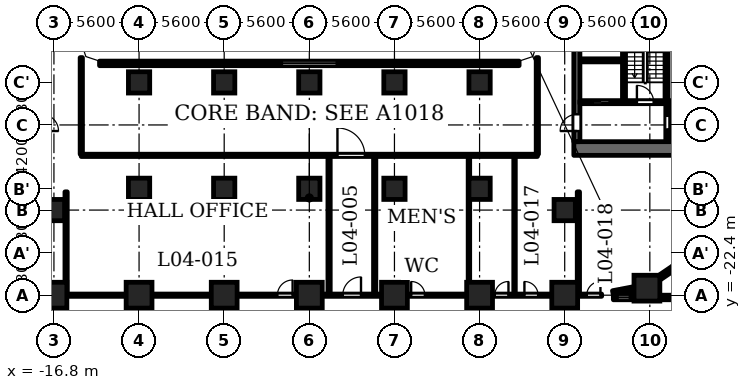
"""IFC4 building model, lengths in metres.
Left out: names, types, materials, properties, quantities, classifications, styles, units other than length and angle.
Written with IfcOpenShell. Run it as: python <this file> out.ifc"""

import sys

from ifc_helpers import new_model, si_unit, direction, frame, frame_2d, origin, origin_2d, place, context, subcontext, project, spatial, polyline, rectangle, outline, extrude, element, fill, save


model = new_model("IFC4")
c1 = context("Model", 3, precision=1e-05, world=origin(), true_north=direction((0.0, 1.0)))
c2 = subcontext(c1, "Body", "Model", "MODEL_VIEW")
j1 = project(units=[si_unit("LENGTHUNIT", "METRE"), si_unit("PLANEANGLEUNIT", "RADIAN")], contexts=[c1])
p1 = place(None, origin())
s1 = spatial("IfcSite", under=j1, at=p1, CompositionType="ELEMENT")
p2 = place(p1, origin())
s2 = spatial("IfcBuilding", under=s1, at=p2, CompositionType="ELEMENT")
p3 = place(p2, frame((0.0, 0.0, 20.9)))
s3 = spatial("IfcBuildingStorey", under=s2, at=p3, CompositionType="ELEMENT", Elevation=20.9)
for number, where, z_axis, x_axis in (
    (1, (-16.8, -22.4, 0.0), (0.0, 0.0, 1.0), (1.0, 0.0, 0.0)),
    (2, (-11.2, -22.4, 0.0), (0.0, 0.0, 1.0), (1.0, 0.0, 0.0)),
    (3, (-5.6, -22.4, 0.0), (0.0, 0.0, 1.0), (1.0, 0.0, 0.0)),
    (4, (0.0, -22.4, 0.0), (0.0, 0.0, 1.0), (1.0, 0.0, 0.0)),
    (5, (5.6, -22.4, 0.0), (0.0, 0.0, 1.0), (1.0, 0.0, 0.0)),
    (6, (11.2, -22.4, 0.0), (0.0, 0.0, 1.0), (1.0, 0.0, 0.0)),
    (7, (16.8, -22.4, 0.0), (0.0, 0.0, 1.0), (1.0, 0.0, 0.0)),
    (8, (22.209, -21.938, 0.0), (0.0, 0.0, 1.0), (1.0, 0.0, 0.0)),
):
    element("IfcColumn", number, at=place(p3, frame(where, z_axis=z_axis, x_axis=x_axis)), inside=s3, PredefinedType="COLUMN", context=c2, shape_type="SweptSolid", body=[
        extrude(rectangle(XDim=1.7, YDim=1.7, at=origin_2d()), origin(), (0.0, 0.0, 1.0), 4.8),
    ])
for number, where, z_axis, x_axis in (
    (9, (-16.8, -16.8, 0.0), (0.0, 0.0, 1.0), (1.0, 0.0, 0.0)),
    (10, (-11.2, -8.4, 0.0), (0.0, 0.0, 1.0), (1.0, 0.0, 0.0)),
    (11, (-5.6, -8.4, 0.0), (0.0, 0.0, 1.0), (1.0, 0.0, 0.0)),
    (12, (0.0, -8.4, 0.0), (0.0, 0.0, 1.0), (1.0, 0.0, 0.0)),
    (13, (5.6, -8.4, 0.0), (0.0, 0.0, 1.0), (1.0, 0.0, 0.0)),
    (14, (11.2, -8.4, 0.0), (0.0, 0.0, 1.0), (1.0, 0.0, 0.0)),
    (15, (16.8, -16.8, 0.0), (0.0, 0.0, 1.0), (1.0, 0.0, 0.0)),
    (16, (-11.2, -15.4, 0.0), (0.0, 0.0, 1.0), (1.0, 0.0, 0.0)),
    (17, (-5.6, -15.4, 0.0), (0.0, 0.0, 1.0), (1.0, 0.0, 0.0)),
    (18, (0.0, -15.4, 0.0), (0.0, 0.0, 1.0), (1.0, 0.0, 0.0)),
    (19, (5.6, -15.4, 0.0), (0.0, 0.0, 1.0), (1.0, 0.0, 0.0)),
    (20, (11.2, -15.4, 0.0), (0.0, 0.0, 1.0), (1.0, 0.0, 0.0)),
):
    element("IfcColumn", number, at=place(p3, frame(where, z_axis=z_axis, x_axis=x_axis)), inside=s3, PredefinedType="COLUMN", context=c2, shape_type="SweptSolid", body=[
        extrude(rectangle(XDim=1.4, YDim=1.4, at=origin_2d()), origin(), (0.0, 0.0, 1.0), 4.8),
    ])
p4 = place(p3, frame((27.5, -22.55, 0.0), z_axis=(0.0, 0.0, 1.0), x_axis=(-1.0, 0.0, 0.0)))
e21 = element("IfcWall", 21, at=p4, inside=s3, PredefinedType="SOLIDWALL", context=c2, shape_type="SweptSolid", body=[
    extrude(rectangle(XDim=4.441, YDim=0.3, at=frame_2d((2.221, 0.0))), origin(), (0.0, 0.0, 1.0), 4.45),
])
p5 = place(p4, frame((1.321, 0.0, 0.9)))
e22 = element("IfcOpeningElement", 22, at=p5, cuts=e21, PredefinedType="OPENING", context=c2, shape_type="SweptSolid", body=[
    extrude(rectangle(XDim=1.8, YDim=1.25, at=frame_2d((0.9, 0.625))), frame((0.0, 0.16, 0.0), z_axis=(0.0, -1.0, 0.0), x_axis=(1.0, 0.0, 0.0)), (0.0, 0.0, 1.0), 0.32),
])
p6 = place(p3, frame((21.359, -22.55, 0.0), z_axis=(0.0, 0.0, 1.0), x_axis=(-1.0, 0.0, 0.0)))
e23 = element("IfcWall", 23, at=p6, inside=s3, PredefinedType="SOLIDWALL", context=c2, shape_type="SweptSolid", body=[
    extrude(rectangle(XDim=1.359, YDim=0.3, at=frame_2d((0.679, 0.0))), origin(), (0.0, 0.0, 1.0), 3.55),
])
p7 = place(p6, frame((0.279, 0.0, 0.6)))
e24 = element("IfcOpeningElement", 24, at=p7, cuts=e23, PredefinedType="OPENING", context=c2, shape_type="SweptSolid", body=[
    extrude(rectangle(XDim=0.8, YDim=1.55, at=frame_2d((0.4, 0.775))), frame((0.0, 0.16, 0.0), z_axis=(0.0, -1.0, 0.0), x_axis=(1.0, 0.0, 0.0)), (0.0, 0.0, 1.0), 0.32),
])
for number, where, z_axis, x_axis in (
    (25, (19.972, -22.253, 0.0), (0.0, 0.0, 1.0), (0.982, 0.187, 0.0)),
    (26, (22.85, -21.369, 0.0), (0.0, 0.0, 1.0), (0.827, 0.562, 0.0)),
):
    element("IfcWall", number, at=place(p3, frame(where, z_axis=z_axis, x_axis=x_axis)), inside=s3, PredefinedType="SOLIDWALL", context=c2, shape_type="SweptSolid", body=[
        extrude(rectangle(XDim=1.406, YDim=0.3, at=frame_2d((0.703, 0.0))), origin(), (0.0, 0.0, 1.0), 3.55),
    ])
p8 = place(p3, frame((13.8, -7.15, 0.0), z_axis=(0.0, 0.0, 1.0), x_axis=(-1.0, 0.0, 0.0)))
e27 = element("IfcWall", 27, at=p8, inside=s3, PredefinedType="SOLIDWALL", context=c2, shape_type="SweptSolid", body=[
    extrude(rectangle(XDim=27.6, YDim=0.3, at=frame_2d((13.8, 0.0))), origin(), (0.0, 0.0, 1.0), 4.45),
])
p9 = place(p8, frame((12.0, 0.0, 1.2)))
e28 = element("IfcOpeningElement", 28, at=p9, cuts=e27, PredefinedType="OPENING", context=c2, shape_type="SweptSolid", body=[
    extrude(rectangle(XDim=3.6, YDim=0.95, at=frame_2d((1.8, 0.475))), frame((0.0, 0.16, 0.0), z_axis=(0.0, -1.0, 0.0), x_axis=(1.0, 0.0, 0.0)), (0.0, 0.0, 1.0), 0.32),
])
p10 = place(p3, frame((20.7, -9.6, 0.0), z_axis=(0.0, 0.0, 1.0), x_axis=(0.0, 1.0, 0.0)))
e29 = element("IfcWall", 29, at=p10, inside=s3, PredefinedType="SHEAR", context=c2, shape_type="SweptSolid", body=[
    extrude(rectangle(XDim=9.75, YDim=0.2, at=frame_2d((4.875, 0.0))), origin(), (0.0, 0.0, 1.0), 4.45),
])
p11 = place(p3, frame((17.4, -12.75, 0.0), z_axis=(0.0, 0.0, 1.0), x_axis=(1.0, 0.0, 0.0)))
e30 = element("IfcWall", 30, at=p11, inside=s3, PredefinedType="SHEAR", context=c2, shape_type="SweptSolid", body=[
    extrude(rectangle(XDim=10.4, YDim=0.9, at=frame_2d((5.2, 0.0))), origin(), (0.0, 0.0, 1.0), 4.45),
])
p12 = place(p3, frame((17.6, -12.3, 0.0), z_axis=(0.0, 0.0, 1.0), x_axis=(0.0, 1.0, 0.0)))
e31 = element("IfcWall", 31, at=p12, inside=s3, PredefinedType="SHEAR", context=c2, shape_type="SweptSolid", body=[
    extrude(rectangle(XDim=24.6, YDim=0.4, at=frame_2d((12.3, 0.0))), origin(), (0.0, 0.0, 1.0), 4.45),
])
p13 = place(p12, frame((6.0, 0.0, 0.0)))
e32 = element("IfcOpeningElement", 32, at=p13, cuts=e31, PredefinedType="OPENING", context=c2, shape_type="SweptSolid", body=[
    extrude(rectangle(XDim=1.1, YDim=2.1, at=frame_2d((0.55, 1.05))), frame((0.0, 0.21, 0.0), z_axis=(0.0, -1.0, 0.0), x_axis=(1.0, 0.0, 0.0)), (0.0, 0.0, 1.0), 0.42),
])
p14 = place(p12, frame((8.4, 0.0, 0.0)))
e33 = element("IfcOpeningElement", 33, at=p14, cuts=e31, PredefinedType="OPENING", context=c2, shape_type="SweptSolid", body=[
    extrude(rectangle(XDim=1.1, YDim=2.1, at=frame_2d((0.55, 1.05))), frame((0.0, 0.21, 0.0), z_axis=(0.0, -1.0, 0.0), x_axis=(1.0, 0.0, 0.0)), (0.0, 0.0, 1.0), 0.42),
])
p15 = place(p12, frame((10.8, 0.0, 0.0)))
e34 = element("IfcOpeningElement", 34, at=p15, cuts=e31, PredefinedType="OPENING", context=c2, shape_type="SweptSolid", body=[
    extrude(rectangle(XDim=1.1, YDim=2.1, at=frame_2d((0.55, 1.05))), frame((0.0, 0.21, 0.0), z_axis=(0.0, -1.0, 0.0), x_axis=(1.0, 0.0, 0.0)), (0.0, 0.0, 1.0), 0.42),
])
p16 = place(p12, frame((16.75, 0.0, 0.0)))
e35 = element("IfcOpeningElement", 35, at=p16, cuts=e31, PredefinedType="OPENING", context=c2, shape_type="SweptSolid", body=[
    extrude(rectangle(XDim=0.9, YDim=2.1, at=frame_2d((0.45, 1.05))), frame((0.0, 0.21, 0.0), z_axis=(0.0, -1.0, 0.0), x_axis=(1.0, 0.0, 0.0)), (0.0, 0.0, 1.0), 0.42),
])
p17 = place(p12, frame((22.8, 0.0, 0.0)))
e36 = element("IfcOpeningElement", 36, at=p17, cuts=e31, PredefinedType="OPENING", context=c2, shape_type="SweptSolid", body=[
    extrude(rectangle(XDim=1.1, YDim=2.1, at=frame_2d((0.55, 1.05))), frame((0.0, 0.21, 0.0), z_axis=(0.0, -1.0, 0.0), x_axis=(1.0, 0.0, 0.0)), (0.0, 0.0, 1.0), 0.42),
])
p18 = place(p12, frame((0.7, 0.0, 0.0)))
e37 = element("IfcOpeningElement", 37, at=p18, cuts=e31, PredefinedType="OPENING", context=c2, shape_type="SweptSolid", body=[
    extrude(rectangle(XDim=1.1, YDim=2.1, at=frame_2d((0.55, 1.05))), frame((0.0, 0.21, 0.0), z_axis=(0.0, -1.0, 0.0), x_axis=(1.0, 0.0, 0.0)), (0.0, 0.0, 1.0), 0.42),
])
p19 = place(p12, frame((12.775, 0.0, 0.0)))
e38 = element("IfcOpeningElement", 38, at=p19, cuts=e31, PredefinedType="OPENING", context=c2, shape_type="SweptSolid", body=[
    extrude(rectangle(XDim=1.8, YDim=2.1, at=frame_2d((0.9, 1.05))), frame((0.0, 0.21, 0.0), z_axis=(0.0, -1.0, 0.0), x_axis=(1.0, 0.0, 0.0)), (0.0, 0.0, 1.0), 0.42),
])
p20 = place(p3, frame((23.55, -12.3, 0.0), z_axis=(0.0, 0.0, 1.0), x_axis=(0.0, 1.0, 0.0)))
e39 = element("IfcWall", 39, at=p20, inside=s3, PredefinedType="PARTITIONING", context=c2, shape_type="SweptSolid", body=[
    extrude(rectangle(XDim=2.5, YDim=0.2, at=frame_2d((1.25, 0.0))), origin(), (0.0, 0.0, 1.0), 4.45),
])
p21 = place(p20, frame((0.8, 0.0, 0.0)))
e40 = element("IfcOpeningElement", 40, at=p21, cuts=e39, PredefinedType="OPENING", context=c2, shape_type="SweptSolid", body=[
    extrude(rectangle(XDim=0.9, YDim=2.1, at=frame_2d((0.45, 1.05))), frame((0.0, 0.11, 0.0), z_axis=(0.0, -1.0, 0.0), x_axis=(1.0, 0.0, 0.0)), (0.0, 0.0, 1.0), 0.22),
])
p22 = place(p3, frame((17.8, -9.7, 0.0), z_axis=(0.0, 0.0, 1.0), x_axis=(1.0, 0.0, 0.0)))
e41 = element("IfcWall", 41, at=p22, inside=s3, PredefinedType="SHEAR", context=c2, shape_type="SweptSolid", body=[
    extrude(rectangle(XDim=8.3, YDim=0.2, at=frame_2d((4.15, 0.0))), origin(), (0.0, 0.0, 1.0), 4.45),
])
p23 = place(p22, frame((0.85, 0.0, 0.0)))
e42 = element("IfcOpeningElement", 42, at=p23, cuts=e41, PredefinedType="OPENING", context=c2, shape_type="SweptSolid", body=[
    extrude(rectangle(XDim=1.1, YDim=2.1, at=frame_2d((0.55, 1.05))), frame((0.0, 0.11, 0.0), z_axis=(0.0, -1.0, 0.0), x_axis=(1.0, 0.0, 0.0)), (0.0, 0.0, 1.0), 0.22),
])
p24 = place(p22, frame((3.75, 0.0, 0.0)))
e43 = element("IfcOpeningElement", 43, at=p24, cuts=e41, PredefinedType="OPENING", context=c2, shape_type="SweptSolid", body=[
    extrude(rectangle(XDim=1.1, YDim=2.1, at=frame_2d((0.55, 1.05))), frame((0.0, 0.11, 0.0), z_axis=(0.0, -1.0, 0.0), x_axis=(1.0, 0.0, 0.0)), (0.0, 0.0, 1.0), 0.22),
])
p25 = place(p3, frame((17.8, -6.95, 0.0), z_axis=(0.0, 0.0, 1.0), x_axis=(1.0, 0.0, 0.0)))
e44 = element("IfcWall", 44, at=p25, inside=s3, PredefinedType="PARTITIONING", context=c2, shape_type="SweptSolid", body=[
    extrude(rectangle(XDim=2.8, YDim=0.2, at=frame_2d((1.4, 0.0))), origin(), (0.0, 0.0, 1.0), 4.45),
])
p26 = place(p3, frame((23.5, -9.6, 0.0), z_axis=(0.0, 0.0, 1.0), x_axis=(0.0, 1.0, 0.0)))
e45 = element("IfcWall", 45, at=p26, inside=s3, PredefinedType="SHEAR", context=c2, shape_type="SweptSolid", body=[
    extrude(rectangle(XDim=6.9, YDim=0.2, at=frame_2d((3.45, 0.0))), origin(), (0.0, 0.0, 1.0), 4.45),
])
p27 = place(p3, frame((-18.98, -22.4, 0.0), z_axis=(0.0, 0.0, 1.0), x_axis=(1.0, 0.0, 0.0)))
e46 = element("IfcWall", 46, at=p27, inside=s3, PredefinedType="PARTITIONING", context=c2, shape_type="SweptSolid", body=[
    extrude(rectangle(XDim=38.211, YDim=0.15, at=frame_2d((19.105, 0.0))), origin(), (0.0, 0.0, 1.0), 3.55),
])
p28 = place(p27, frame((21.18, 0.0, 0.0)))
e47 = element("IfcOpeningElement", 47, at=p28, cuts=e46, PredefinedType="OPENING", context=c2, shape_type="SweptSolid", body=[
    extrude(rectangle(XDim=1.2, YDim=2.1, at=frame_2d((0.6, 1.05))), frame((0.0, 0.085, 0.0), z_axis=(0.0, -1.0, 0.0), x_axis=(1.0, 0.0, 0.0)), (0.0, 0.0, 1.0), 0.17),
])
p29 = place(p27, frame((0.08, 0.0, 0.0)))
e48 = element("IfcOpeningElement", 48, at=p29, cuts=e46, PredefinedType="OPENING", context=c2, shape_type="SweptSolid", body=[
    extrude(rectangle(XDim=1.0, YDim=2.1, at=frame_2d((0.5, 1.05))), frame((0.0, 0.085, 0.0), z_axis=(0.0, -1.0, 0.0), x_axis=(1.0, 0.0, 0.0)), (0.0, 0.0, 1.0), 0.17),
])
p30 = place(p27, frame((16.88, 0.0, 0.0)))
e49 = element("IfcOpeningElement", 49, at=p30, cuts=e46, PredefinedType="OPENING", context=c2, shape_type="SweptSolid", body=[
    extrude(rectangle(XDim=1.0, YDim=2.1, at=frame_2d((0.5, 1.05))), frame((0.0, 0.085, 0.0), z_axis=(0.0, -1.0, 0.0), x_axis=(1.0, 0.0, 0.0)), (0.0, 0.0, 1.0), 0.17),
])
p31 = place(p27, frame((25.68, 0.0, 0.0)))
e50 = element("IfcOpeningElement", 50, at=p31, cuts=e46, PredefinedType="OPENING", context=c2, shape_type="SweptSolid", body=[
    extrude(rectangle(XDim=0.9, YDim=2.1, at=frame_2d((0.45, 1.05))), frame((0.0, 0.085, 0.0), z_axis=(0.0, -1.0, 0.0), x_axis=(1.0, 0.0, 0.0)), (0.0, 0.0, 1.0), 0.17),
])
p32 = place(p27, frame((31.18, 0.0, 0.0)))
e51 = element("IfcOpeningElement", 51, at=p32, cuts=e46, PredefinedType="OPENING", context=c2, shape_type="SweptSolid", body=[
    extrude(rectangle(XDim=0.9, YDim=2.1, at=frame_2d((0.45, 1.05))), frame((0.0, 0.085, 0.0), z_axis=(0.0, -1.0, 0.0), x_axis=(1.0, 0.0, 0.0)), (0.0, 0.0, 1.0), 0.17),
])
p33 = place(p27, frame((33.13, 0.0, 0.0)))
e52 = element("IfcOpeningElement", 52, at=p33, cuts=e46, PredefinedType="OPENING", context=c2, shape_type="SweptSolid", body=[
    extrude(rectangle(XDim=0.9, YDim=2.1, at=frame_2d((0.45, 1.05))), frame((0.0, 0.085, 0.0), z_axis=(0.0, -1.0, 0.0), x_axis=(1.0, 0.0, 0.0)), (0.0, 0.0, 1.0), 0.17),
])
p34 = place(p27, frame((37.231, 0.0, 0.0)))
e53 = element("IfcOpeningElement", 53, at=p34, cuts=e46, PredefinedType="OPENING", context=c2, shape_type="SweptSolid", body=[
    extrude(rectangle(XDim=0.9, YDim=2.1, at=frame_2d((0.45, 1.05))), frame((0.0, 0.085, 0.0), z_axis=(0.0, -1.0, 0.0), x_axis=(1.0, 0.0, 0.0)), (0.0, 0.0, 1.0), 0.17),
])
p35 = place(p3, frame((-15.005, -13.2, 0.0), z_axis=(0.0, 0.0, 1.0), x_axis=(1.0, 0.0, 0.0)))
e54 = element("IfcWall", 54, at=p35, inside=s3, PredefinedType="PARTITIONING", context=c2, shape_type="SweptSolid", body=[
    extrude(rectangle(XDim=30.01, YDim=0.15, at=frame_2d((15.005, 0.0))), origin(), (0.0, 0.0, 1.0), 4.45),
])
p36 = place(p35, frame((16.855, 0.0, 0.0)))
e55 = element("IfcOpeningElement", 55, at=p36, cuts=e54, PredefinedType="OPENING", context=c2, shape_type="SweptSolid", body=[
    extrude(rectangle(XDim=1.8, YDim=2.1, at=frame_2d((0.9, 1.05))), frame((0.0, 0.085, 0.0), z_axis=(0.0, -1.0, 0.0), x_axis=(1.0, 0.0, 0.0)), (0.0, 0.0, 1.0), 0.17),
])
p37 = place(p3, frame((-16.0, -22.325, 0.0), z_axis=(0.0, 0.0, 1.0), x_axis=(0.0, 1.0, 0.0)))
e56 = element("IfcWall", 56, at=p37, inside=s3, PredefinedType="PARTITIONING", context=c2, shape_type="SweptSolid", body=[
    extrude(rectangle(XDim=6.725, YDim=0.15, at=frame_2d((3.362, 0.0))), origin(), (0.0, 0.0, 1.0), 4.45),
])
p38 = place(p3, frame((-15.0, -13.125, 0.0), z_axis=(0.0, 0.0, 1.0), x_axis=(0.0, 1.0, 0.0)))
e57 = element("IfcWall", 57, at=p38, inside=s3, PredefinedType="PARTITIONING", context=c2, shape_type="SweptSolid", body=[
    extrude(rectangle(XDim=6.356, YDim=0.15, at=frame_2d((3.178, 0.0))), origin(), (0.0, 0.0, 1.0), 4.45),
])
for number, where, z_axis, x_axis in (
    (58, (1.3, -22.325, 0.0), (0.0, 0.0, 1.0), (0.0, 1.0, 0.0)),
    (59, (4.3, -22.325, 0.0), (0.0, 0.0, 1.0), (0.0, 1.0, 0.0)),
):
    element("IfcWall", number, at=place(p3, frame(where, z_axis=z_axis, x_axis=x_axis)), inside=s3, PredefinedType="PARTITIONING", context=c2, shape_type="SweptSolid", body=[
        extrude(rectangle(XDim=9.05, YDim=0.15, at=frame_2d((4.525, 0.0))), origin(), (0.0, 0.0, 1.0), 4.45),
    ])
for number, where, z_axis, x_axis in (
    (60, (10.5, -22.325, 0.0), (0.0, 0.0, 1.0), (0.0, 1.0, 0.0)),
    (61, (13.5, -22.325, 0.0), (0.0, 0.0, 1.0), (0.0, 1.0, 0.0)),
):
    element("IfcWall", number, at=place(p3, frame(where, z_axis=z_axis, x_axis=x_axis)), inside=s3, PredefinedType="PARTITIONING", context=c2, shape_type="SweptSolid", body=[
        extrude(rectangle(XDim=9.05, YDim=0.1, at=frame_2d((4.525, 0.0))), origin(), (0.0, 0.0, 1.0), 4.45),
    ])
p39 = place(p3, frame((15.0, -13.125, 0.0), z_axis=(0.0, 0.0, 1.0), x_axis=(0.0, 1.0, 0.0)))
e62 = element("IfcWall", 62, at=p39, inside=s3, PredefinedType="PARTITIONING", context=c2, shape_type="SweptSolid", body=[
    extrude(rectangle(XDim=6.356, YDim=0.15, at=frame_2d((3.178, 0.0))), origin(), (0.0, 0.0, 1.0), 4.45),
])
p40 = place(p3, frame((17.7, -22.325, 0.0), z_axis=(0.0, 0.0, 1.0), x_axis=(0.0, 1.0, 0.0)))
e63 = element("IfcWall", 63, at=p40, inside=s3, PredefinedType="PARTITIONING", context=c2, shape_type="SweptSolid", body=[
    extrude(rectangle(XDim=6.725, YDim=0.15, at=frame_2d((3.362, 0.0))), origin(), (0.0, 0.0, 1.0), 4.45),
])
p41 = place(p3, origin())
e64 = element("IfcWall", 64, at=p41, inside=s3, PredefinedType="SOLIDWALL", context=c2, shape_type="SweptSolid", body=[
    extrude(outline(polyline([(19.944, -22.105), (19.251, -22.238), (19.251, -22.7), (20.0, -22.7), (20.0, -22.4), (19.944, -22.105)])), origin(), (0.0, 0.0, 1.0), 3.55),
])
e65 = element("IfcWall", 65, at=p41, inside=s3, PredefinedType="SOLIDWALL", context=c2, shape_type="SweptSolid", body=[
    extrude(outline(polyline([(14.937, -6.937), (15.3, -5.849), (15.3, -5.8), (15.0, -5.8), (14.7, -6.7), (13.8, -7.0), (13.8, -7.3), (13.849, -7.3), (14.937, -6.937)])), origin(), (0.0, 0.0, 1.0), 4.45),
])
e66 = element("IfcWall", 66, at=p41, inside=s3, PredefinedType="SOLIDWALL", context=c2, shape_type="SweptSolid", body=[
    extrude(outline(polyline([(-14.937, -6.937), (-13.849, -7.3), (-13.8, -7.3), (-13.8, -7.0), (-14.7, -6.7), (-15.0, -5.8), (-15.3, -5.8), (-15.3, -5.849), (-14.937, -6.937)])), origin(), (0.0, 0.0, 1.0), 4.45),
])
p42 = place(p23, origin())
e67 = element("IfcDoor", 67, at=p42, inside=s3, OperationType="DOUBLE_DOOR_SLIDING", PredefinedType="DOOR", context=c2, shape_type="SweptSolid", body=[
    extrude(rectangle(XDim=1.1, YDim=2.1, at=frame_2d((0.55, 1.05))), frame((0.0, 0.025, 0.0), z_axis=(0.0, -1.0, 0.0), x_axis=(1.0, 0.0, 0.0)), (0.0, 0.0, 1.0), 0.05),
])
fill(e42, e67)
p43 = place(p18, origin())
e68 = element("IfcDoor", 68, at=p43, inside=s3, OperationType="SINGLE_SWING_RIGHT", PredefinedType="DOOR", context=c2, shape_type="SweptSolid", body=[
    extrude(rectangle(XDim=1.1, YDim=2.1, at=frame_2d((0.55, 1.05))), frame((0.0, 0.025, 0.0), z_axis=(0.0, -1.0, 0.0), x_axis=(1.0, 0.0, 0.0)), (0.0, 0.0, 1.0), 0.05),
])
fill(e37, e68)
p44 = place(p21, origin())
e69 = element("IfcDoor", 69, at=p44, inside=s3, OperationType="SINGLE_SWING_LEFT", PredefinedType="DOOR", context=c2, shape_type="SweptSolid", body=[
    extrude(rectangle(XDim=0.9, YDim=2.1, at=frame_2d((0.45, 1.05))), frame((0.0, 0.025, 0.0), z_axis=(0.0, -1.0, 0.0), x_axis=(1.0, 0.0, 0.0)), (0.0, 0.0, 1.0), 0.05),
])
fill(e40, e69)
p45 = place(p24, origin())
e70 = element("IfcDoor", 70, at=p45, inside=s3, OperationType="SINGLE_SWING_RIGHT", PredefinedType="DOOR", context=c2, shape_type="SweptSolid", body=[
    extrude(rectangle(XDim=1.1, YDim=2.1, at=frame_2d((0.55, 1.05))), frame((0.0, 0.025, 0.0), z_axis=(0.0, -1.0, 0.0), x_axis=(1.0, 0.0, 0.0)), (0.0, 0.0, 1.0), 0.05),
])
fill(e43, e70)
p46 = place(p36, origin())
e71 = element("IfcDoor", 71, at=p46, inside=s3, OperationType="SINGLE_SWING_RIGHT", PredefinedType="DOOR", context=c2, shape_type="SweptSolid", body=[
    extrude(rectangle(XDim=1.8, YDim=2.1, at=frame_2d((0.9, 1.05))), frame((0.0, 0.025, 0.0), z_axis=(0.0, -1.0, 0.0), x_axis=(1.0, 0.0, 0.0)), (0.0, 0.0, 1.0), 0.05),
])
fill(e55, e71)
p47 = place(p28, origin())
e72 = element("IfcDoor", 72, at=p47, inside=s3, OperationType="SINGLE_SWING_LEFT", PredefinedType="DOOR", context=c2, shape_type="SweptSolid", body=[
    extrude(rectangle(XDim=1.2, YDim=2.1, at=frame_2d((0.6, 1.05))), frame((0.0, 0.025, 0.0), z_axis=(0.0, -1.0, 0.0), x_axis=(1.0, 0.0, 0.0)), (0.0, 0.0, 1.0), 0.05),
])
fill(e47, e72)
p48 = place(p30, origin())
e73 = element("IfcDoor", 73, at=p48, inside=s3, OperationType="SINGLE_SWING_LEFT", PredefinedType="DOOR", context=c2, shape_type="SweptSolid", body=[
    extrude(rectangle(XDim=1.0, YDim=2.1, at=frame_2d((0.5, 1.05))), frame((0.0, 0.025, 0.0), z_axis=(0.0, -1.0, 0.0), x_axis=(1.0, 0.0, 0.0)), (0.0, 0.0, 1.0), 0.05),
])
fill(e49, e73)
p49 = place(p31, origin())
e74 = element("IfcDoor", 74, at=p49, inside=s3, OperationType="SINGLE_SWING_RIGHT", PredefinedType="DOOR", context=c2, shape_type="SweptSolid", body=[
    extrude(rectangle(XDim=0.9, YDim=2.1, at=frame_2d((0.45, 1.05))), frame((0.0, 0.025, 0.0), z_axis=(0.0, -1.0, 0.0), x_axis=(1.0, 0.0, 0.0)), (0.0, 0.0, 1.0), 0.05),
])
fill(e50, e74)
p50 = place(p32, origin())
e75 = element("IfcDoor", 75, at=p50, inside=s3, OperationType="SINGLE_SWING_LEFT", PredefinedType="DOOR", context=c2, shape_type="SweptSolid", body=[
    extrude(rectangle(XDim=0.9, YDim=2.1, at=frame_2d((0.45, 1.05))), frame((0.0, 0.025, 0.0), z_axis=(0.0, -1.0, 0.0), x_axis=(1.0, 0.0, 0.0)), (0.0, 0.0, 1.0), 0.05),
])
fill(e51, e75)
p51 = place(p33, origin())
e76 = element("IfcDoor", 76, at=p51, inside=s3, OperationType="SINGLE_SWING_RIGHT", PredefinedType="DOOR", context=c2, shape_type="SweptSolid", body=[
    extrude(rectangle(XDim=0.9, YDim=2.1, at=frame_2d((0.45, 1.05))), frame((0.0, 0.025, 0.0), z_axis=(0.0, -1.0, 0.0), x_axis=(1.0, 0.0, 0.0)), (0.0, 0.0, 1.0), 0.05),
])
fill(e52, e76)
p52 = place(p34, origin())
e77 = element("IfcDoor", 77, at=p52, inside=s3, OperationType="SINGLE_SWING_LEFT", PredefinedType="DOOR", context=c2, shape_type="SweptSolid", body=[
    extrude(rectangle(XDim=0.9, YDim=2.1, at=frame_2d((0.45, 1.05))), frame((0.0, 0.025, 0.0), z_axis=(0.0, -1.0, 0.0), x_axis=(1.0, 0.0, 0.0)), (0.0, 0.0, 1.0), 0.05),
])
fill(e53, e77)
p53 = place(p7, origin())
e78 = element("IfcWindow", 78, at=p53, inside=s3, PartitioningType="SINGLE_PANEL", PredefinedType="WINDOW", context=c2, shape_type="SweptSolid", body=[
    extrude(rectangle(XDim=0.8, YDim=1.55, at=frame_2d((0.4, 0.775))), frame((0.0, 0.03, 0.0), z_axis=(0.0, -1.0, 0.0), x_axis=(1.0, 0.0, 0.0)), (0.0, 0.0, 1.0), 0.06),
])
fill(e24, e78)
p54 = place(p9, origin())
e79 = element("IfcWindow", 79, at=p54, inside=s3, PartitioningType="SINGLE_PANEL", PredefinedType="WINDOW", context=c2, shape_type="SweptSolid", body=[
    extrude(rectangle(XDim=3.6, YDim=0.95, at=frame_2d((1.8, 0.475))), frame((0.0, 0.03, 0.0), z_axis=(0.0, -1.0, 0.0), x_axis=(1.0, 0.0, 0.0)), (0.0, 0.0, 1.0), 0.06),
])
fill(e28, e79)
save(model, sys.argv[1])
